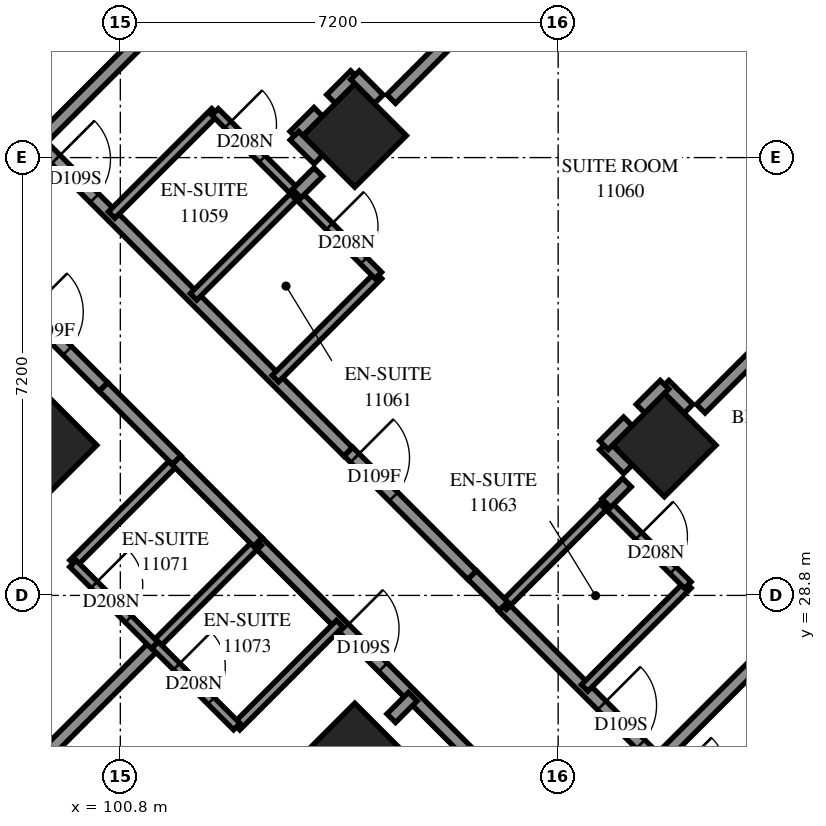
"""IFC4 building model, lengths in metres.
Left out: names, types, materials, properties, quantities, classifications, styles, units other than length and angle.
Written with IfcOpenShell. Run it as: python <this file> out.ifc"""

import sys

from ifc_helpers import new_model, si_unit, direction, frame, frame_2d, origin, origin_2d, place, context, subcontext, project, spatial, rectangle, extrude, element, fill, save


model = new_model("IFC4")
c1 = context("Model", 3, precision=1e-05, world=origin(), true_north=direction((0.0, 1.0)))
c2 = subcontext(c1, "Body", "Model", "MODEL_VIEW")
j1 = project(units=[si_unit("LENGTHUNIT", "METRE"), si_unit("PLANEANGLEUNIT", "RADIAN")], contexts=[c1])
p1 = place(None, origin())
s1 = spatial("IfcSite", under=j1, at=p1, CompositionType="ELEMENT")
p2 = place(p1, origin())
s2 = spatial("IfcBuilding", under=s1, at=p2, CompositionType="ELEMENT")
p3 = place(p2, frame((0.0, 0.0, 44.0)))
s3 = spatial("IfcBuildingStorey", under=s2, at=p3, CompositionType="ELEMENT", Elevation=44.0)
for number, where, z_axis, x_axis in (
    (1, (104.656, 36.362, 0.0), (0.0, 0.0, 1.0), (0.707, -0.707, 0.0)),
    (2, (99.565, 31.271, 0.0), (0.0, 0.0, 1.0), (0.707, -0.707, 0.0)),
    (3, (109.747, 31.271, 0.0), (0.0, 0.0, 1.0), (0.707, -0.707, 0.0)),
    (4, (104.656, 26.18, 0.0), (0.0, 0.0, 1.0), (0.707, -0.707, 0.0)),
):
    element("IfcColumn", number, at=place(p3, frame(where, z_axis=z_axis, x_axis=x_axis)), inside=s3, PredefinedType="COLUMN", context=c2, shape_type="SweptSolid", body=[
        extrude(rectangle(XDim=1.2, YDim=1.2, at=origin_2d()), origin(), (0.0, 0.0, 1.0), 3.1),
    ])
p4 = place(p3, frame((99.459, 36.255, 0.0), z_axis=(0.0, 0.0, 1.0), x_axis=(0.7071903932, 0.7070231593, 0.0)))
e5 = element("IfcWall", 5, at=p4, inside=s3, PredefinedType="PARTITIONING", context=c2, shape_type="SweptSolid", body=[
    extrude(rectangle(XDim=11.959, YDim=0.2, at=frame_2d((5.98, 0.0))), origin(), (0.0, 0.0, 1.0), 3.1),
])
p5 = place(p3, frame((103.061, 29.677, 0.0), z_axis=(0.0, 0.0, 1.0), x_axis=(0.7071067812, -0.7071067812, 0.0)))
e6 = element("IfcWall", 6, at=p5, inside=s3, PredefinedType="PARTITIONING", context=c2, shape_type="SweptSolid", body=[
    extrude(rectangle(XDim=10.802, YDim=0.2, at=frame_2d((5.401, 0.0))), origin(), (0.0, 0.0, 1.0), 3.1),
])
p6 = place(p5, frame((2.012, 0.0, 0.0)))
e7 = element("IfcOpeningElement", 7, at=p6, cuts=e6, PredefinedType="OPENING", context=c2, shape_type="SweptSolid", body=[
    extrude(rectangle(XDim=0.9, YDim=2.1, at=frame_2d((0.45, 1.05))), frame((0.0, 0.11, 0.0), z_axis=(0.0, -1.0, 0.0), x_axis=(1.0, 0.0, 0.0)), (0.0, 0.0, 1.0), 0.22),
])
p7 = place(p5, frame((7.463, 0.0, 0.0)))
e8 = element("IfcOpeningElement", 8, at=p7, cuts=e6, PredefinedType="OPENING", context=c2, shape_type="SweptSolid", body=[
    extrude(rectangle(XDim=1.0, YDim=2.1, at=frame_2d((0.5, 1.05))), frame((0.0, 0.11, 0.0), z_axis=(0.0, -1.0, 0.0), x_axis=(1.0, 0.0, 0.0)), (0.0, 0.0, 1.0), 0.22),
])
p8 = place(p3, frame((99.455, 36.253, 0.0), z_axis=(0.0, 0.0, 1.0), x_axis=(0.7071067812, -0.7071067812, 0.0)))
e9 = element("IfcWall", 9, at=p8, inside=s3, PredefinedType="PARTITIONING", context=c2, shape_type="SweptSolid", body=[
    extrude(rectangle(XDim=7.201, YDim=0.2, at=frame_2d((3.601, 0.0))), origin(), (0.0, 0.0, 1.0), 3.1),
])
p9 = place(p8, frame((0.401, 0.0, 0.0)))
e10 = element("IfcOpeningElement", 10, at=p9, cuts=e9, PredefinedType="OPENING", context=c2, shape_type="SweptSolid", body=[
    extrude(rectangle(XDim=0.9, YDim=2.1, at=frame_2d((0.45, 1.05))), frame((0.0, 0.11, 0.0), z_axis=(0.0, -1.0, 0.0), x_axis=(1.0, 0.0, 0.0)), (0.0, 0.0, 1.0), 0.22),
])
p10 = place(p3, frame((96.53, 23.146, 0.0), z_axis=(0.0, 0.0, 1.0), x_axis=(0.7071140909, 0.7070994714, 0.0)))
e11 = element("IfcWall", 11, at=p10, inside=s3, PredefinedType="PARTITIONING", context=c2, shape_type="SweptSolid", body=[
    extrude(rectangle(XDim=6.84, YDim=0.2, at=frame_2d((3.42, 0.0))), origin(), (0.0, 0.0, 1.0), 3.1),
])
p11 = place(p3, frame((109.64, 26.074, 0.0), z_axis=(0.0, 0.0, 1.0), x_axis=(0.7072538194, 0.7069597124, 0.0)))
e12 = element("IfcWall", 12, at=p11, inside=s3, PredefinedType="PARTITIONING", context=c2, shape_type="SweptSolid", body=[
    extrude(rectangle(XDim=6.8, YDim=0.2, at=frame_2d((3.4, 0.0))), origin(), (0.0, 0.0, 1.0), 3.1),
])
for number, where, z_axis, x_axis in (
    (13, (110.345, 31.871, 0.0), (0.0, 0.0, 1.0), (0.707, 0.707, 0.0)),
    (14, (105.255, 36.963, 0.0), (0.0, 0.0, 1.0), (0.707, 0.707, 0.0)),
):
    element("IfcWall", number, at=place(p3, frame(where, z_axis=z_axis, x_axis=x_axis)), inside=s3, PredefinedType="PARTITIONING", context=c2, shape_type="SweptSolid", body=[
        extrude(rectangle(XDim=5.504, YDim=0.2, at=frame_2d((2.752, 0.0))), origin(), (0.0, 0.0, 1.0), 3.1),
    ])
p12 = place(p3, frame((107.093, 28.615, 0.0), z_axis=(0.0, 0.0, 1.0), x_axis=(0.7072011313, -0.7070124185, 0.0)))
e15 = element("IfcWall", 15, at=p12, inside=s3, PredefinedType="PARTITIONING", context=c2, shape_type="SweptSolid", body=[
    extrude(rectangle(XDim=5.299, YDim=0.2, at=frame_2d((2.65, 0.0))), origin(), (0.0, 0.0, 1.0), 3.1),
])
p13 = place(p12, frame((2.299, 0.0, 0.0)))
e16 = element("IfcOpeningElement", 16, at=p13, cuts=e15, PredefinedType="OPENING", context=c2, shape_type="SweptSolid", body=[
    extrude(rectangle(XDim=0.9, YDim=2.1, at=frame_2d((0.45, 1.05))), frame((0.0, 0.11, 0.0), z_axis=(0.0, -1.0, 0.0), x_axis=(1.0, 0.0, 0.0)), (0.0, 0.0, 1.0), 0.22),
])
p14 = place(p12, frame((3.949, 0.0, 0.0)))
e17 = element("IfcOpeningElement", 17, at=p14, cuts=e15, PredefinedType="OPENING", context=c2, shape_type="SweptSolid", body=[
    extrude(rectangle(XDim=0.9, YDim=2.1, at=frame_2d((0.45, 1.05))), frame((0.0, 0.11, 0.0), z_axis=(0.0, -1.0, 0.0), x_axis=(1.0, 0.0, 0.0)), (0.0, 0.0, 1.0), 0.22),
])
p15 = place(p3, frame((97.976, 34.772, 0.0), z_axis=(0.0, 0.0, 1.0), x_axis=(0.7073845681, -0.7068288851, 0.0)))
e18 = element("IfcWall", 18, at=p15, inside=s3, PredefinedType="PARTITIONING", context=c2, shape_type="SweptSolid", body=[
    extrude(rectangle(XDim=3.599, YDim=0.2, at=frame_2d((1.8, 0.0))), origin(), (0.0, 0.0, 1.0), 3.1),
])
p16 = place(p15, frame((1.858, 0.0, 0.0)))
e19 = element("IfcOpeningElement", 19, at=p16, cuts=e18, PredefinedType="OPENING", context=c2, shape_type="SweptSolid", body=[
    extrude(rectangle(XDim=0.9, YDim=2.1, at=frame_2d((0.45, 1.05))), frame((0.0, 0.11, 0.0), z_axis=(0.0, -1.0, 0.0), x_axis=(1.0, 0.0, 0.0)), (0.0, 0.0, 1.0), 0.22),
])
p17 = place(p3, frame((104.551, 31.165, 0.0), z_axis=(0.0, 0.0, 1.0), x_axis=(0.7074545101, -0.7067588812, 0.0)))
e20 = element("IfcWall", 20, at=p17, inside=s3, PredefinedType="PARTITIONING", context=c2, shape_type="SweptSolid", body=[
    extrude(rectangle(XDim=2.875, YDim=0.2, at=frame_2d((1.438, 0.0))), origin(), (0.0, 0.0, 1.0), 3.1),
])
p18 = place(p17, frame((0.148, 0.0, 0.0)))
e21 = element("IfcOpeningElement", 21, at=p18, cuts=e20, PredefinedType="OPENING", context=c2, shape_type="SweptSolid", body=[
    extrude(rectangle(XDim=0.9, YDim=2.1, at=frame_2d((0.45, 1.05))), frame((0.0, 0.11, 0.0), z_axis=(0.0, -1.0, 0.0), x_axis=(1.0, 0.0, 0.0)), (0.0, 0.0, 1.0), 0.22),
])
for number, where, z_axis, x_axis in (
    (22, (102.003, 33.711, 0.0), (0.0, 0.0, 1.0), (0.707, 0.707, 0.0)),
    (23, (100.023, 29.327, 0.0), (0.0, 0.0, 1.0), (0.707, 0.707, 0.0)),
):
    element("IfcWall", number, at=place(p3, frame(where, z_axis=z_axis, x_axis=x_axis)), inside=s3, PredefinedType="PARTITIONING", context=c2, shape_type="SweptSolid", body=[
        extrude(rectangle(XDim=2.401, YDim=0.15, at=frame_2d((1.201, 0.0))), origin(), (0.0, 0.0, 1.0), 3.1),
    ])
for number, where, z_axis, x_axis in (
    (24, (100.657, 35.057, 0.0), (0.0, 0.0, 1.0), (0.708, 0.707, 0.0)),
    (25, (101.371, 27.979, 0.0), (0.0, 0.0, 1.0), (0.707, 0.708, 0.0)),
    (26, (108.435, 27.279, 0.0), (0.0, 0.0, 1.0), (0.708, 0.707, 0.0)),
    (27, (103.349, 32.365, 0.0), (0.0, 0.0, 1.0), (0.707, 0.708, 0.0)),
):
    element("IfcWall", number, at=place(p3, frame(where, z_axis=z_axis, x_axis=x_axis)), inside=s3, PredefinedType="PARTITIONING", context=c2, shape_type="SweptSolid", body=[
        extrude(rectangle(XDim=2.4, YDim=0.15, at=frame_2d((1.2, 0.0))), origin(), (0.0, 0.0, 1.0), 3.1),
    ])
for number, where, z_axis, x_axis in (
    (28, (102.711, 26.641, 0.0), (0.0, 0.0, 1.0), (0.707, 0.707, 0.0)),
    (29, (107.095, 28.621, 0.0), (0.0, 0.0, 1.0), (0.707, 0.707, 0.0)),
    (30, (110.843, 24.873, 0.0), (0.0, 0.0, 1.0), (0.707, 0.707, 0.0)),
):
    element("IfcWall", number, at=place(p3, frame(where, z_axis=z_axis, x_axis=x_axis)), inside=s3, PredefinedType="PARTITIONING", context=c2, shape_type="SweptSolid", body=[
        extrude(rectangle(XDim=2.398, YDim=0.15, at=frame_2d((1.199, 0.0))), origin(), (0.0, 0.0, 1.0), 3.1),
    ])
p19 = place(p3, frame((100.021, 29.323, 0.0), z_axis=(0.0, 0.0, 1.0), x_axis=(0.7071067812, -0.7071067812, 0.0)))
e31 = element("IfcWall", 31, at=p19, inside=s3, PredefinedType="PARTITIONING", context=c2, shape_type="SweptSolid", body=[
    extrude(rectangle(XDim=1.901, YDim=0.15, at=frame_2d((0.95, 0.0))), origin(), (0.0, 0.0, 1.0), 3.1),
])
p20 = place(p19, frame((0.491, 0.0, 0.0)))
e32 = element("IfcOpeningElement", 32, at=p20, cuts=e31, PredefinedType="OPENING", context=c2, shape_type="SweptSolid", body=[
    extrude(rectangle(XDim=0.8, YDim=2.1, at=frame_2d((0.4, 1.05))), frame((0.0, 0.085, 0.0), z_axis=(0.0, -1.0, 0.0), x_axis=(1.0, 0.0, 0.0)), (0.0, 0.0, 1.0), 0.17),
])
p21 = place(p3, frame((108.789, 30.313, 0.0), z_axis=(0.0, 0.0, 1.0), x_axis=(0.7071067812, -0.7071067812, 0.0)))
e33 = element("IfcWall", 33, at=p21, inside=s3, PredefinedType="PARTITIONING", context=c2, shape_type="SweptSolid", body=[
    extrude(rectangle(XDim=1.901, YDim=0.15, at=frame_2d((0.95, 0.0))), origin(), (0.0, 0.0, 1.0), 3.1),
])
p22 = place(p21, frame((0.76, 0.0, 0.0)))
e34 = element("IfcOpeningElement", 34, at=p22, cuts=e33, PredefinedType="OPENING", context=c2, shape_type="SweptSolid", body=[
    extrude(rectangle(XDim=0.8, YDim=2.1, at=frame_2d((0.4, 1.05))), frame((0.0, 0.085, 0.0), z_axis=(0.0, -1.0, 0.0), x_axis=(1.0, 0.0, 0.0)), (0.0, 0.0, 1.0), 0.17),
])
p23 = place(p3, frame((101.371, 27.985, 0.0), z_axis=(0.0, 0.0, 1.0), x_axis=(0.7076330979, -0.7065800724, 0.0)))
e35 = element("IfcWall", 35, at=p23, inside=s3, PredefinedType="PARTITIONING", context=c2, shape_type="SweptSolid", body=[
    extrude(rectangle(XDim=1.899, YDim=0.15, at=frame_2d((0.95, 0.0))), origin(), (0.0, 0.0, 1.0), 3.1),
])
p24 = place(p23, frame((0.501, 0.0, 0.0)))
e36 = element("IfcOpeningElement", 36, at=p24, cuts=e35, PredefinedType="OPENING", context=c2, shape_type="SweptSolid", body=[
    extrude(rectangle(XDim=0.8, YDim=2.1, at=frame_2d((0.4, 1.05))), frame((0.0, 0.085, 0.0), z_axis=(0.0, -1.0, 0.0), x_axis=(1.0, 0.0, 0.0)), (0.0, 0.0, 1.0), 0.17),
])
p25 = place(p3, frame((103.701, 35.407, 0.0), z_axis=(0.0, 0.0, 1.0), x_axis=(0.7065800724, -0.7076330979, 0.0)))
e37 = element("IfcWall", 37, at=p25, inside=s3, PredefinedType="PARTITIONING", context=c2, shape_type="SweptSolid", body=[
    extrude(rectangle(XDim=1.899, YDim=0.15, at=frame_2d((0.95, 0.0))), origin(), (0.0, 0.0, 1.0), 3.1),
])
p26 = place(p25, frame((0.759, 0.0, 0.0)))
e38 = element("IfcOpeningElement", 38, at=p26, cuts=e37, PredefinedType="OPENING", context=c2, shape_type="SweptSolid", body=[
    extrude(rectangle(XDim=0.8, YDim=2.1, at=frame_2d((0.4, 1.05))), frame((0.0, 0.085, 0.0), z_axis=(0.0, -1.0, 0.0), x_axis=(1.0, 0.0, 0.0)), (0.0, 0.0, 1.0), 0.17),
])
p27 = place(p3, frame((101.72, 31.022, 0.0), z_axis=(0.0, 0.0, 1.0), x_axis=(0.7065800724, -0.7076330979, 0.0)))
e39 = element("IfcWall", 39, at=p27, inside=s3, PredefinedType="PARTITIONING", context=c2, shape_type="SweptSolid", body=[
    extrude(rectangle(XDim=1.899, YDim=0.2, at=frame_2d((0.95, 0.0))), origin(), (0.0, 0.0, 1.0), 3.1),
])
p28 = place(p3, frame((102.358, 36.75, 0.0), z_axis=(0.0, 0.0, 1.0), x_axis=(0.7076330979, -0.7065800724, 0.0)))
e40 = element("IfcWall", 40, at=p28, inside=s3, PredefinedType="PARTITIONING", context=c2, shape_type="SweptSolid", body=[
    extrude(rectangle(XDim=1.899, YDim=0.15, at=frame_2d((0.95, 0.0))), origin(), (0.0, 0.0, 1.0), 3.1),
])
p29 = place(p28, frame((0.296, 0.0, 0.0)))
e41 = element("IfcOpeningElement", 41, at=p29, cuts=e40, PredefinedType="OPENING", context=c2, shape_type="SweptSolid", body=[
    extrude(rectangle(XDim=0.8, YDim=2.1, at=frame_2d((0.4, 1.05))), frame((0.0, 0.085, 0.0), z_axis=(0.0, -1.0, 0.0), x_axis=(1.0, 0.0, 0.0)), (0.0, 0.0, 1.0), 0.17),
])
p30 = place(p3, frame((100.523, 32.229, 0.0), z_axis=(0.0, 0.0, 1.0), x_axis=(0.7071067812, -0.7071067812, 0.0)))
e42 = element("IfcWall", 42, at=p30, inside=s3, PredefinedType="PARTITIONING", context=c2, shape_type="SweptSolid", body=[
    extrude(rectangle(XDim=1.7, YDim=0.2, at=frame_2d((0.85, 0.0))), origin(), (0.0, 0.0, 1.0), 3.1),
])
p31 = place(p3, frame((106.587, 29.135, 0.0), z_axis=(0.0, 0.0, 1.0), x_axis=(0.7071067812, -0.7071067812, 0.0)))
e43 = element("IfcWall", 43, at=p31, inside=s3, PredefinedType="PARTITIONING", context=c2, shape_type="SweptSolid", body=[
    extrude(rectangle(XDim=0.724, YDim=0.2, at=frame_2d((0.362, 0.0))), origin(), (0.0, 0.0, 1.0), 3.1),
])
for number, where, z_axis, x_axis in (
    (44, (108.754, 31.268, 0.0), (0.0, 0.0, 1.0), (0.707, -0.707, 0.0)),
    (45, (109.751, 32.265, 0.0), (0.0, 0.0, 1.0), (0.707, -0.707, 0.0)),
    (46, (109.355, 31.871, 0.0), (0.0, 0.0, 1.0), (0.707, 0.707, 0.0)),
    (47, (108.753, 31.269, 0.0), (0.0, 0.0, 1.0), (0.707, 0.707, 0.0)),
    (48, (103.661, 36.359, 0.0), (0.0, 0.0, 1.0), (0.707, 0.707, 0.0)),
    (49, (104.265, 36.963, 0.0), (0.0, 0.0, 1.0), (0.707, 0.707, 0.0)),
):
    element("IfcWall", number, at=place(p3, frame(where, z_axis=z_axis, x_axis=x_axis)), inside=s3, PredefinedType="PARTITIONING", context=c2, shape_type="SweptSolid", body=[
        extrude(rectangle(XDim=0.557, YDim=0.2, at=frame_2d((0.279, 0.0))), origin(), (0.0, 0.0, 1.0), 3.1),
    ])
for number, where, z_axis, x_axis in (
    (50, (104.659, 37.355, 0.0), (0.0, 0.0, 1.0), (0.705, -0.709, 0.0)),
    (51, (103.664, 36.36, 0.0), (0.0, 0.0, 1.0), (0.709, -0.705, 0.0)),
):
    element("IfcWall", number, at=place(p3, frame(where, z_axis=z_axis, x_axis=x_axis)), inside=s3, PredefinedType="PARTITIONING", context=c2, shape_type="SweptSolid", body=[
        extrude(rectangle(XDim=0.556, YDim=0.2, at=frame_2d((0.278, 0.0))), origin(), (0.0, 0.0, 1.0), 3.1),
    ])
for number, where, z_axis, x_axis in (
    (52, (105.255, 26.781, 0.0), (0.0, 0.0, 1.0), (0.707, 0.707, 0.0)),
    (53, (103.701, 35.409, 0.0), (0.0, 0.0, 1.0), (0.707, 0.707, 0.0)),
):
    element("IfcWall", number, at=place(p3, frame(where, z_axis=z_axis, x_axis=x_axis)), inside=s3, PredefinedType="PARTITIONING", context=c2, shape_type="SweptSolid", body=[
        extrude(rectangle(XDim=0.501, YDim=0.2, at=frame_2d((0.25, 0.0))), origin(), (0.0, 0.0, 1.0), 3.1),
    ])
p32 = place(p3, frame((108.791, 30.317, 0.0), z_axis=(0.0, 0.0, 1.0), x_axis=(0.7071067812, 0.7071067812, 0.0)))
e54 = element("IfcWall", 54, at=p32, inside=s3, PredefinedType="PARTITIONING", context=c2, shape_type="SweptSolid", body=[
    extrude(rectangle(XDim=0.481, YDim=0.2, at=frame_2d((0.24, 0.0))), origin(), (0.0, 0.0, 1.0), 3.1),
])
p33 = place(p9, origin())
e55 = element("IfcDoor", 55, at=p33, inside=s3, OperationType="SINGLE_SWING_RIGHT", PredefinedType="DOOR", context=c2, shape_type="SweptSolid", body=[
    extrude(rectangle(XDim=0.9, YDim=2.1, at=frame_2d((0.45, 1.05))), frame((0.0, 0.025, 0.0), z_axis=(0.0, -1.0, 0.0), x_axis=(1.0, 0.0, 0.0)), (0.0, 0.0, 1.0), 0.05),
])
fill(e10, e55)
p34 = place(p29, origin())
e56 = element("IfcDoor", 56, at=p34, inside=s3, OperationType="SINGLE_SWING_RIGHT", PredefinedType="DOOR", context=c2, shape_type="SweptSolid", body=[
    extrude(rectangle(XDim=0.8, YDim=2.1, at=frame_2d((0.4, 1.05))), frame((0.0, 0.025, 0.0), z_axis=(0.0, -1.0, 0.0), x_axis=(1.0, 0.0, 0.0)), (0.0, 0.0, 1.0), 0.05),
])
fill(e41, e56)
p35 = place(p18, origin())
e57 = element("IfcDoor", 57, at=p35, inside=s3, OperationType="SINGLE_SWING_LEFT", PredefinedType="DOOR", context=c2, shape_type="SweptSolid", body=[
    extrude(rectangle(XDim=0.9, YDim=2.1, at=frame_2d((0.45, 1.05))), frame((0.0, 0.025, 0.0), z_axis=(0.0, -1.0, 0.0), x_axis=(1.0, 0.0, 0.0)), (0.0, 0.0, 1.0), 0.05),
])
fill(e21, e57)
p36 = place(p26, origin())
e58 = element("IfcDoor", 58, at=p36, inside=s3, OperationType="SINGLE_SWING_RIGHT", PredefinedType="DOOR", context=c2, shape_type="SweptSolid", body=[
    extrude(rectangle(XDim=0.8, YDim=2.1, at=frame_2d((0.4, 1.05))), frame((0.0, 0.025, 0.0), z_axis=(0.0, -1.0, 0.0), x_axis=(1.0, 0.0, 0.0)), (0.0, 0.0, 1.0), 0.05),
])
fill(e38, e58)
p37 = place(p13, origin())
e59 = element("IfcDoor", 59, at=p37, inside=s3, OperationType="SINGLE_SWING_LEFT", PredefinedType="DOOR", context=c2, shape_type="SweptSolid", body=[
    extrude(rectangle(XDim=0.9, YDim=2.1, at=frame_2d((0.45, 1.05))), frame((0.0, 0.025, 0.0), z_axis=(0.0, -1.0, 0.0), x_axis=(1.0, 0.0, 0.0)), (0.0, 0.0, 1.0), 0.05),
])
fill(e16, e59)
p38 = place(p22, origin())
e60 = element("IfcDoor", 60, at=p38, inside=s3, OperationType="SINGLE_SWING_RIGHT", PredefinedType="DOOR", context=c2, shape_type="SweptSolid", body=[
    extrude(rectangle(XDim=0.8, YDim=2.1, at=frame_2d((0.4, 1.05))), frame((0.0, 0.025, 0.0), z_axis=(0.0, -1.0, 0.0), x_axis=(1.0, 0.0, 0.0)), (0.0, 0.0, 1.0), 0.05),
])
fill(e34, e60)
p39 = place(p16, origin())
e61 = element("IfcDoor", 61, at=p39, inside=s3, OperationType="SINGLE_SWING_LEFT", PredefinedType="DOOR", context=c2, shape_type="SweptSolid", body=[
    extrude(rectangle(XDim=0.9, YDim=2.1, at=frame_2d((0.45, 1.05))), frame((0.0, 0.025, 0.0), z_axis=(0.0, -1.0, 0.0), x_axis=(1.0, 0.0, 0.0)), (0.0, 0.0, 1.0), 0.05),
])
fill(e19, e61)
p40 = place(p20, origin())
e62 = element("IfcDoor", 62, at=p40, inside=s3, OperationType="SINGLE_SWING_RIGHT", PredefinedType="DOOR", context=c2, shape_type="SweptSolid", body=[
    extrude(rectangle(XDim=0.8, YDim=2.1, at=frame_2d((0.4, 1.05))), frame((0.0, 0.025, 0.0), z_axis=(0.0, -1.0, 0.0), x_axis=(1.0, 0.0, 0.0)), (0.0, 0.0, 1.0), 0.05),
])
fill(e32, e62)
p41 = place(p6, origin())
e63 = element("IfcDoor", 63, at=p41, inside=s3, OperationType="SINGLE_SWING_LEFT", PredefinedType="DOOR", context=c2, shape_type="SweptSolid", body=[
    extrude(rectangle(XDim=0.9, YDim=2.1, at=frame_2d((0.45, 1.05))), frame((0.0, 0.025, 0.0), z_axis=(0.0, -1.0, 0.0), x_axis=(1.0, 0.0, 0.0)), (0.0, 0.0, 1.0), 0.05),
])
fill(e7, e63)
p42 = place(p24, origin())
e64 = element("IfcDoor", 64, at=p42, inside=s3, OperationType="SINGLE_SWING_RIGHT", PredefinedType="DOOR", context=c2, shape_type="SweptSolid", body=[
    extrude(rectangle(XDim=0.8, YDim=2.1, at=frame_2d((0.4, 1.05))), frame((0.0, 0.025, 0.0), z_axis=(0.0, -1.0, 0.0), x_axis=(1.0, 0.0, 0.0)), (0.0, 0.0, 1.0), 0.05),
])
fill(e36, e64)
save(model, sys.argv[1])
